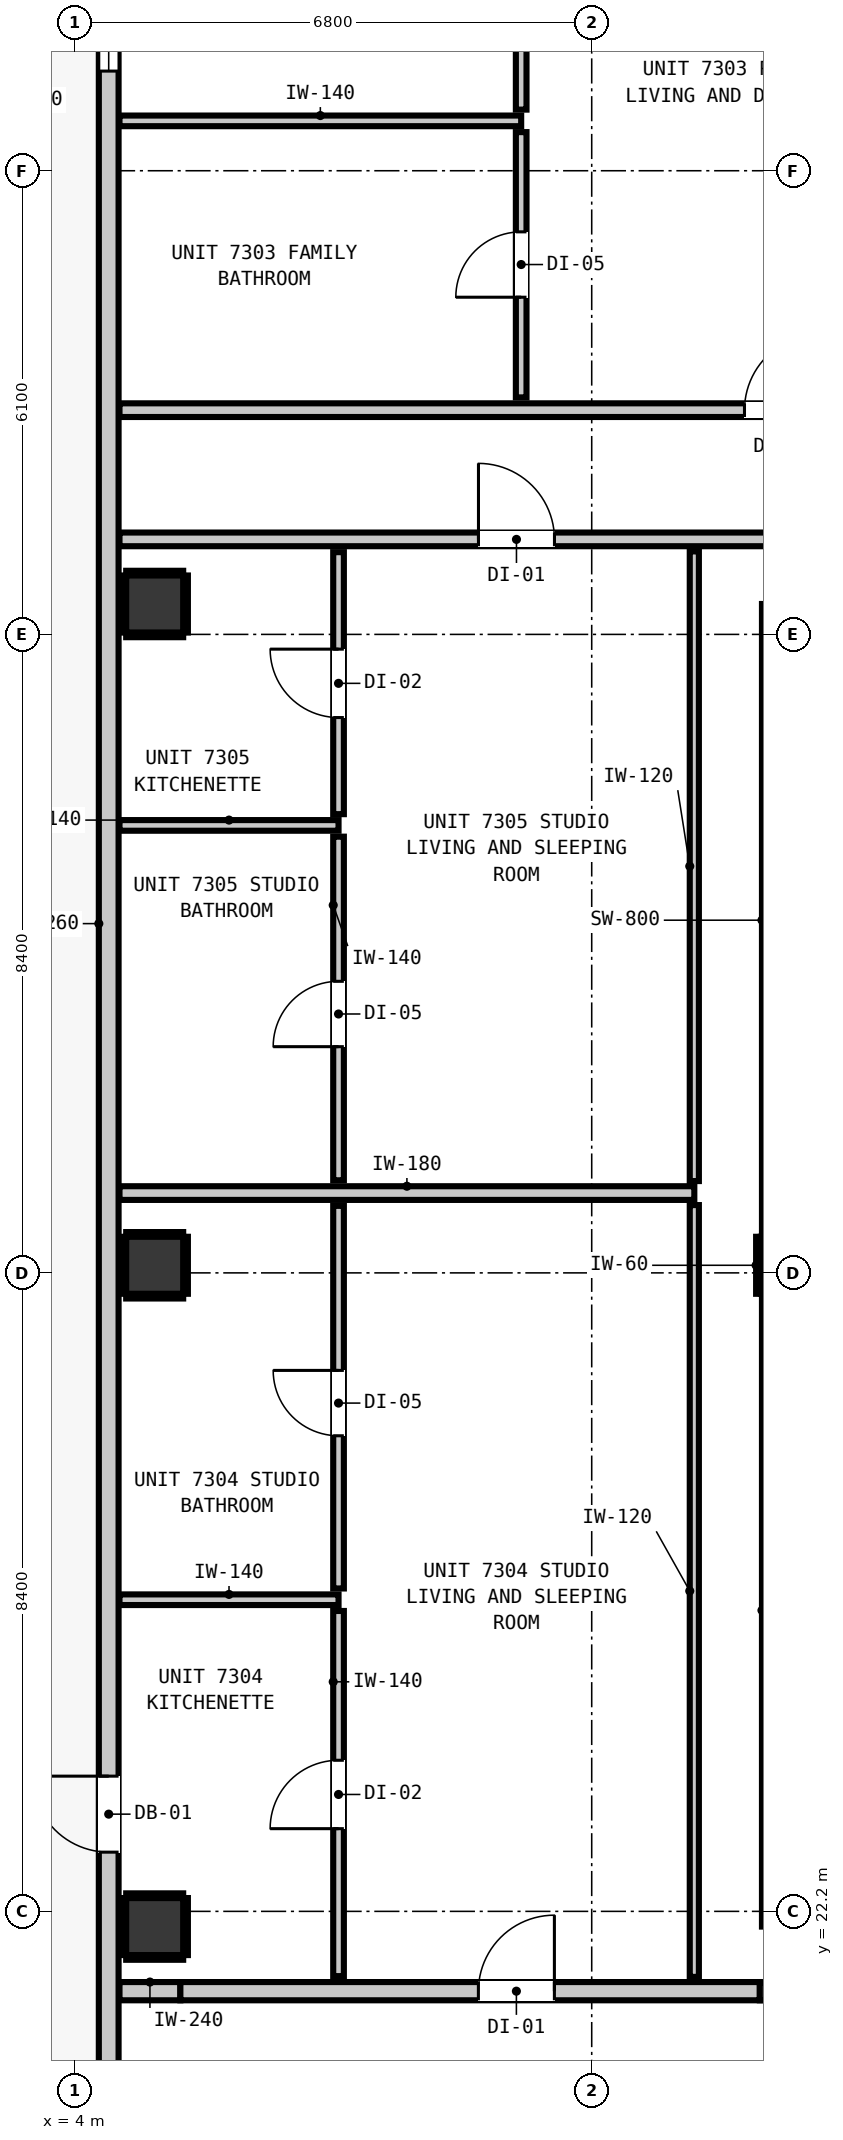
"""IFC4 building model, lengths in metres.
Left out: names, types, materials, properties, quantities, classifications, styles, units other than length and angle.
Written with IfcOpenShell. Run it as: python <this file> out.ifc"""

import sys

from ifc_helpers import new_model, si_unit, direction, frame, frame_2d, origin, origin_2d, place, context, subcontext, project, spatial, rectangle, extrude, element, fill, save


model = new_model("IFC4")
c1 = context("Model", 3, precision=1e-05, world=origin(), true_north=direction((0.0, 1.0)))
c2 = subcontext(c1, "Body", "Model", "MODEL_VIEW")
j1 = project(units=[si_unit("LENGTHUNIT", "METRE"), si_unit("PLANEANGLEUNIT", "RADIAN")], contexts=[c1])
p1 = place(None, origin())
s1 = spatial("IfcSite", under=j1, at=p1, CompositionType="ELEMENT")
p2 = place(p1, origin())
s2 = spatial("IfcBuilding", under=s1, at=p2, CompositionType="ELEMENT")
p3 = place(p2, frame((0.0, 0.0, 251.2)))
s3 = spatial("IfcBuildingStorey", under=s2, at=p3, CompositionType="ELEMENT", Elevation=251.2)
p4 = place(p3, frame((13.4, 30.7, 0.0), z_axis=(0.0, 0.0, 1.0), x_axis=(1.0, 0.0, 0.0)))
e1 = element("IfcColumn", 1, at=p4, inside=s3, PredefinedType="COLUMN", context=c2, shape_type="SweptSolid", body=[
    extrude(rectangle(XDim=0.75, YDim=0.75, at=origin_2d()), origin(), (0.0, 0.0, 1.0), 3.32),
])
p5 = place(p3, frame((13.44, 22.0, 0.0), z_axis=(0.0, 0.0, 1.0), x_axis=(0.0, 1.0, 0.0)))
e2 = element("IfcWall", 2, at=p5, inside=s3, PredefinedType="SHEAR", context=c2, shape_type="SweptSolid", body=[
    extrude(rectangle(XDim=8.32, YDim=0.8, at=frame_2d((4.16, 0.0))), origin(), (0.0, 0.0, 1.0), 3.32),
])
p6 = place(p3, frame((13.44, 31.08, 0.0), z_axis=(0.0, 0.0, 1.0), x_axis=(0.0, 1.0, 0.0)))
e3 = element("IfcWall", 3, at=p6, inside=s3, PredefinedType="SHEAR", context=c2, shape_type="SweptSolid", body=[
    extrude(rectangle(XDim=8.32, YDim=0.8, at=frame_2d((4.16, 0.0))), origin(), (0.0, 0.0, 1.0), 3.32),
])
for number, where, z_axis, x_axis in (
    (4, (5.05, 22.0, -0.2), (0.0, 0.0, 1.0), (1.0, 0.0, 0.0)),
    (5, (5.05, 30.7, -0.2), (0.0, 0.0, 1.0), (1.0, 0.0, 0.0)),
    (6, (5.05, 39.4, -0.2), (0.0, 0.0, 1.0), (1.0, 0.0, 0.0)),
):
    element("IfcColumn", number, at=place(p3, frame(where, z_axis=z_axis, x_axis=x_axis)), inside=s3, PredefinedType="COLUMN", context=c2, shape_type="SweptSolid", body=[
        extrude(rectangle(XDim=0.75, YDim=0.75, at=origin_2d()), origin(), (0.0, 0.0, 1.0), 3.52),
    ])
p7 = place(p3, frame((4.445, 18.545, 0.0), z_axis=(0.0, 0.0, 1.0), x_axis=(0.0, 1.0, 0.0)))
e7 = element("IfcWall", 7, at=p7, inside=s3, PredefinedType="STANDARD", context=c2, shape_type="SweptSolid", body=[
    extrude(rectangle(XDim=30.31, YDim=0.26, at=frame_2d((15.155, 0.0))), origin(), (0.0, 0.0, 1.0), 3.1),
])
p8 = place(p7, frame((4.434, 0.0, 0.0)))
e8 = element("IfcOpeningElement", 8, at=p8, cuts=e7, PredefinedType="OPENING", context=c2, shape_type="SweptSolid", body=[
    extrude(rectangle(XDim=1.0, YDim=2.15, at=frame_2d((0.5, 1.075))), frame((0.0, 0.14, 0.0), z_axis=(0.0, -1.0, 0.0), x_axis=(1.0, 0.0, 0.0)), (0.0, 0.0, 1.0), 0.28),
])
p9 = place(p7, frame((27.866, 0.0, 0.85)))
e9 = element("IfcOpeningElement", 9, at=p9, cuts=e7, PredefinedType="OPENING", context=c2, shape_type="SweptSolid", body=[
    extrude(rectangle(XDim=1.8, YDim=1.9, at=frame_2d((0.9, 0.95))), frame((0.0, 0.14, 0.0), z_axis=(0.0, -1.0, 0.0), x_axis=(1.0, 0.0, 0.0)), (0.0, 0.0, 1.0), 0.28),
])
p10 = place(p3, frame((4.587, 21.15, 0.0), z_axis=(0.0, 0.0, 1.0), x_axis=(1.0, 0.0, 0.0)))
e10 = element("IfcWall", 10, at=p10, inside=s3, PredefinedType="PARTITIONING", context=c2, shape_type="SweptSolid", body=[
    extrude(rectangle(XDim=0.801, YDim=0.24, at=frame_2d((0.4, 0.0))), origin(), (0.0, 0.0, 1.0), 3.1),
])
p11 = place(p3, frame((5.388, 21.15, 0.0), z_axis=(0.0, 0.0, 1.0), x_axis=(1.0, 0.0, 0.0)))
e11 = element("IfcWall", 11, at=p11, inside=s3, PredefinedType="PARTITIONING", context=c2, shape_type="SweptSolid", body=[
    extrude(rectangle(XDim=7.624, YDim=0.24, at=frame_2d((3.812, 0.0))), origin(), (0.0, 0.0, 1.0), 2.477),
])
p12 = place(p11, frame((3.921, 0.0, 0.0)))
e12 = element("IfcOpeningElement", 12, at=p12, cuts=e11, PredefinedType="OPENING", context=c2, shape_type="SweptSolid", body=[
    extrude(rectangle(XDim=1.0, YDim=2.15, at=frame_2d((0.5, 1.075))), frame((0.0, 0.13, 0.0), z_axis=(0.0, -1.0, 0.0), x_axis=(1.0, 0.0, 0.0)), (0.0, 0.0, 1.0), 0.26),
])
p13 = place(p3, frame((13.012, 21.15, 0.0), z_axis=(0.0, 0.0, 1.0), x_axis=(1.0, 0.0, 0.0)))
e13 = element("IfcWall", 13, at=p13, inside=s3, PredefinedType="PARTITIONING", context=c2, shape_type="SweptSolid", body=[
    extrude(rectangle(XDim=28.201, YDim=0.24, at=frame_2d((14.101, 0.0))), origin(), (0.0, 0.0, 1.0), 3.1),
])
p14 = place(p13, frame((5.198, 0.0, 0.0)))
e14 = element("IfcOpeningElement", 14, at=p14, cuts=e13, PredefinedType="OPENING", context=c2, shape_type="SweptSolid", body=[
    extrude(rectangle(XDim=1.1, YDim=2.15, at=frame_2d((0.55, 1.075))), frame((0.0, 0.13, 0.0), z_axis=(0.0, -1.0, 0.0), x_axis=(1.0, 0.0, 0.0)), (0.0, 0.0, 1.0), 0.26),
])
p15 = place(p3, frame((4.587, 31.65, 0.0), z_axis=(0.0, 0.0, 1.0), x_axis=(1.0, 0.0, 0.0)))
e15 = element("IfcWall", 15, at=p15, inside=s3, PredefinedType="PARTITIONING", context=c2, shape_type="SweptSolid", body=[
    extrude(rectangle(XDim=7.563, YDim=0.18, at=frame_2d((3.781, 0.0))), origin(), (0.0, 0.0, 1.0), 3.1),
])
p16 = place(p3, frame((4.587, 40.25, 0.0), z_axis=(0.0, 0.0, 1.0), x_axis=(1.0, 0.0, 0.0)))
e16 = element("IfcWall", 16, at=p16, inside=s3, PredefinedType="PARTITIONING", context=c2, shape_type="SweptSolid", body=[
    extrude(rectangle(XDim=36.626, YDim=0.18, at=frame_2d((18.313, 0.0))), origin(), (0.0, 0.0, 1.0), 3.1),
])
p17 = place(p16, frame((12.848, 0.0, 0.0)))
e17 = element("IfcOpeningElement", 17, at=p17, cuts=e16, PredefinedType="OPENING", context=c2, shape_type="SweptSolid", body=[
    extrude(rectangle(XDim=1.4, YDim=2.15, at=frame_2d((0.7, 1.075))), frame((0.0, 0.1, 0.0), z_axis=(0.0, -1.0, 0.0), x_axis=(1.0, 0.0, 0.0)), (0.0, 0.0, 1.0), 0.2),
])
p18 = place(p16, frame((4.723, 0.0, 0.0)))
e18 = element("IfcOpeningElement", 18, at=p18, cuts=e16, PredefinedType="OPENING", context=c2, shape_type="SweptSolid", body=[
    extrude(rectangle(XDim=1.0, YDim=2.15, at=frame_2d((0.5, 1.075))), frame((0.0, 0.1, 0.0), z_axis=(0.0, -1.0, 0.0), x_axis=(1.0, 0.0, 0.0)), (0.0, 0.0, 1.0), 0.2),
])
p19 = place(p3, frame((4.587, 41.95, 0.0), z_axis=(0.0, 0.0, 1.0), x_axis=(1.0, 0.0, 0.0)))
e19 = element("IfcWall", 19, at=p19, inside=s3, PredefinedType="PARTITIONING", context=c2, shape_type="SweptSolid", body=[
    extrude(rectangle(XDim=36.626, YDim=0.18, at=frame_2d((18.313, 0.0))), origin(), (0.0, 0.0, 1.0), 3.1),
])
p20 = place(p19, frame((8.223, 0.0, 0.0)))
e20 = element("IfcOpeningElement", 20, at=p20, cuts=e19, PredefinedType="OPENING", context=c2, shape_type="SweptSolid", body=[
    extrude(rectangle(XDim=1.0, YDim=2.15, at=frame_2d((0.5, 1.075))), frame((0.0, 0.1, 0.0), z_axis=(0.0, -1.0, 0.0), x_axis=(1.0, 0.0, 0.0)), (0.0, 0.0, 1.0), 0.2),
])
p21 = place(p19, frame((29.299, 0.0, 0.0)))
e21 = element("IfcOpeningElement", 21, at=p21, cuts=e19, PredefinedType="OPENING", context=c2, shape_type="SweptSolid", body=[
    extrude(rectangle(XDim=0.9, YDim=2.1, at=frame_2d((0.45, 1.05))), frame((0.0, 0.1, 0.0), z_axis=(0.0, -1.0, 0.0), x_axis=(1.0, 0.0, 0.0)), (0.0, 0.0, 1.0), 0.2),
])
for number, where, z_axis, x_axis in (
    (22, (4.587, 26.3, 0.0), (0.0, 0.0, 1.0), (1.0, 0.0, 0.0)),
    (23, (4.587, 36.487, 0.0), (0.0, 0.0, 1.0), (1.0, 0.0, 0.0)),
):
    element("IfcWall", number, at=place(p3, frame(where, z_axis=z_axis, x_axis=x_axis)), inside=s3, PredefinedType="PARTITIONING", context=c2, shape_type="SweptSolid", body=[
        extrude(rectangle(XDim=2.882, YDim=0.14, at=frame_2d((1.441, 0.0))), origin(), (0.0, 0.0, 1.0), 3.1),
    ])
p22 = place(p3, frame((4.587, 45.756, 0.0), z_axis=(0.0, 0.0, 1.0), x_axis=(1.0, 0.0, 0.0)))
e24 = element("IfcWall", 24, at=p22, inside=s3, PredefinedType="PARTITIONING", context=c2, shape_type="SweptSolid", body=[
    extrude(rectangle(XDim=5.285, YDim=0.14, at=frame_2d((2.643, 0.0))), origin(), (0.0, 0.0, 1.0), 3.1),
])
p23 = place(p3, frame((7.469, 21.348, 0.0), z_axis=(0.0, 0.0, 1.0), x_axis=(0.0, 1.0, 0.0)))
e25 = element("IfcWall", 25, at=p23, inside=s3, PredefinedType="PARTITIONING", context=c2, shape_type="SweptSolid", body=[
    extrude(rectangle(XDim=4.804, YDim=0.14, at=frame_2d((2.402, 0.0))), origin(), (0.0, 0.0, 1.0), 3.1),
])
p24 = place(p23, frame((1.94, 0.0, 0.0)))
e26 = element("IfcOpeningElement", 26, at=p24, cuts=e25, PredefinedType="OPENING", context=c2, shape_type="SweptSolid", body=[
    extrude(rectangle(XDim=0.9, YDim=2.1, at=frame_2d((0.45, 1.05))), frame((0.0, 0.08, 0.0), z_axis=(0.0, -1.0, 0.0), x_axis=(1.0, 0.0, 0.0)), (0.0, 0.0, 1.0), 0.16),
])
p25 = place(p3, frame((7.469, 26.448, 0.0), z_axis=(0.0, 0.0, 1.0), x_axis=(0.0, 1.0, 0.0)))
e27 = element("IfcWall", 27, at=p25, inside=s3, PredefinedType="PARTITIONING", context=c2, shape_type="SweptSolid", body=[
    extrude(rectangle(XDim=5.034, YDim=0.14, at=frame_2d((2.517, 0.0))), origin(), (0.0, 0.0, 1.0), 3.1),
])
p26 = place(p25, frame((2.009, 0.0, 0.0)))
e28 = element("IfcOpeningElement", 28, at=p26, cuts=e27, PredefinedType="OPENING", context=c2, shape_type="SweptSolid", body=[
    extrude(rectangle(XDim=0.86, YDim=2.02, at=frame_2d((0.43, 1.01))), frame((0.0, 0.08, 0.0), z_axis=(0.0, -1.0, 0.0), x_axis=(1.0, 0.0, 0.0)), (0.0, 0.0, 1.0), 0.16),
])
p27 = place(p3, frame((7.469, 31.818, 0.0), z_axis=(0.0, 0.0, 1.0), x_axis=(0.0, 1.0, 0.0)))
e29 = element("IfcWall", 29, at=p27, inside=s3, PredefinedType="PARTITIONING", context=c2, shape_type="SweptSolid", body=[
    extrude(rectangle(XDim=4.521, YDim=0.14, at=frame_2d((2.26, 0.0))), origin(), (0.0, 0.0, 1.0), 3.1),
])
p28 = place(p27, frame((1.758, 0.0, 0.0)))
e30 = element("IfcOpeningElement", 30, at=p28, cuts=e29, PredefinedType="OPENING", context=c2, shape_type="SweptSolid", body=[
    extrude(rectangle(XDim=0.86, YDim=2.02, at=frame_2d((0.43, 1.01))), frame((0.0, 0.08, 0.0), z_axis=(0.0, -1.0, 0.0), x_axis=(1.0, 0.0, 0.0)), (0.0, 0.0, 1.0), 0.16),
])
p29 = place(p3, frame((7.469, 36.635, 0.0), z_axis=(0.0, 0.0, 1.0), x_axis=(0.0, 1.0, 0.0)))
e31 = element("IfcWall", 31, at=p29, inside=s3, PredefinedType="PARTITIONING", context=c2, shape_type="SweptSolid", body=[
    extrude(rectangle(XDim=3.447, YDim=0.14, at=frame_2d((1.724, 0.0))), origin(), (0.0, 0.0, 1.0), 3.1),
])
p30 = place(p29, frame((1.271, 0.0, 0.0)))
e32 = element("IfcOpeningElement", 32, at=p30, cuts=e31, PredefinedType="OPENING", context=c2, shape_type="SweptSolid", body=[
    extrude(rectangle(XDim=0.9, YDim=2.1, at=frame_2d((0.45, 1.05))), frame((0.0, 0.08, 0.0), z_axis=(0.0, -1.0, 0.0), x_axis=(1.0, 0.0, 0.0)), (0.0, 0.0, 1.0), 0.16),
])
p31 = place(p3, frame((9.872, 42.118, 0.0), z_axis=(0.0, 0.0, 1.0), x_axis=(0.0, 1.0, 0.0)))
e33 = element("IfcWall", 33, at=p31, inside=s3, PredefinedType="PARTITIONING", context=c2, shape_type="SweptSolid", body=[
    extrude(rectangle(XDim=3.49, YDim=0.14, at=frame_2d((1.745, 0.0))), origin(), (0.0, 0.0, 1.0), 3.1),
])
p32 = place(p31, frame((1.318, 0.0, 0.0)))
e34 = element("IfcOpeningElement", 34, at=p32, cuts=e33, PredefinedType="OPENING", context=c2, shape_type="SweptSolid", body=[
    extrude(rectangle(XDim=0.86, YDim=2.02, at=frame_2d((0.43, 1.01))), frame((0.0, 0.08, 0.0), z_axis=(0.0, -1.0, 0.0), x_axis=(1.0, 0.0, 0.0)), (0.0, 0.0, 1.0), 0.16),
])
p33 = place(p3, frame((9.872, 45.904, 0.0), z_axis=(0.0, 0.0, 1.0), x_axis=(0.0, 1.0, 0.0)))
e35 = element("IfcWall", 35, at=p33, inside=s3, PredefinedType="PARTITIONING", context=c2, shape_type="SweptSolid", body=[
    extrude(rectangle(XDim=4.909, YDim=0.14, at=frame_2d((2.455, 0.0))), origin(), (0.0, 0.0, 1.0), 3.1),
])
p34 = place(p33, frame((1.911, 0.0, 0.0)))
e36 = element("IfcOpeningElement", 36, at=p34, cuts=e35, PredefinedType="OPENING", context=c2, shape_type="SweptSolid", body=[
    extrude(rectangle(XDim=0.9, YDim=2.1, at=frame_2d((0.45, 1.05))), frame((0.0, 0.08, 0.0), z_axis=(0.0, -1.0, 0.0), x_axis=(1.0, 0.0, 0.0)), (0.0, 0.0, 1.0), 0.16),
])
p35 = place(p3, frame((12.15, 21.338, 0.0), z_axis=(0.0, 0.0, 1.0), x_axis=(0.0, 1.0, 0.0)))
e37 = element("IfcWall", 37, at=p35, inside=s3, PredefinedType="PARTITIONING", context=c2, shape_type="SweptSolid", body=[
    extrude(rectangle(XDim=10.154, YDim=0.12, at=frame_2d((5.077, 0.0))), origin(), (0.0, 0.0, 1.0), 3.1),
])
p36 = place(p3, frame((12.15, 31.808, 0.0), z_axis=(0.0, 0.0, 1.0), x_axis=(0.0, 1.0, 0.0)))
e38 = element("IfcWall", 38, at=p36, inside=s3, PredefinedType="PARTITIONING", context=c2, shape_type="SweptSolid", body=[
    extrude(rectangle(XDim=8.284, YDim=0.12, at=frame_2d((4.142, 0.0))), origin(), (0.0, 0.0, 1.0), 3.1),
])
for number, where, z_axis, x_axis in (
    (39, (12.993, 30.325, 0.0), (0.0, 0.0, 1.0), (0.0, 1.0, 0.0)),
    (40, (4.675, 21.593, 0.0), (0.0, 0.0, 1.0), (1.0, 0.0, 0.0)),
    (41, (4.675, 22.407, 0.0), (0.0, 0.0, 1.0), (1.0, 0.0, 0.0)),
    (42, (4.643, 21.625, 0.0), (0.0, 0.0, 1.0), (0.0, 1.0, 0.0)),
    (43, (5.457, 21.625, 0.0), (0.0, 0.0, 1.0), (0.0, 1.0, 0.0)),
    (44, (4.675, 30.293, 0.0), (0.0, 0.0, 1.0), (1.0, 0.0, 0.0)),
    (45, (4.675, 31.107, 0.0), (0.0, 0.0, 1.0), (1.0, 0.0, 0.0)),
    (46, (4.643, 30.325, 0.0), (0.0, 0.0, 1.0), (0.0, 1.0, 0.0)),
    (47, (5.457, 30.325, 0.0), (0.0, 0.0, 1.0), (0.0, 1.0, 0.0)),
    (48, (4.675, 38.993, 0.0), (0.0, 0.0, 1.0), (1.0, 0.0, 0.0)),
    (49, (4.675, 39.807, 0.0), (0.0, 0.0, 1.0), (1.0, 0.0, 0.0)),
    (50, (4.643, 39.025, 0.0), (0.0, 0.0, 1.0), (0.0, 1.0, 0.0)),
    (51, (5.457, 39.025, 0.0), (0.0, 0.0, 1.0), (0.0, 1.0, 0.0)),
):
    element("IfcWall", number, at=place(p3, frame(where, z_axis=z_axis, x_axis=x_axis)), inside=s3, PredefinedType="PARTITIONING", context=c2, shape_type="SweptSolid", body=[
        extrude(rectangle(XDim=0.75, YDim=0.06, at=frame_2d((0.375, 0.0))), origin(), (0.0, 0.0, 1.0), 1.45),
    ])
p37 = place(p8, origin())
e52 = element("IfcDoor", 52, at=p37, inside=s3, OperationType="SINGLE_SWING_RIGHT", PredefinedType="DOOR", context=c2, shape_type="SweptSolid", body=[
    extrude(rectangle(XDim=1.0, YDim=2.15, at=frame_2d((0.5, 1.075))), frame((0.0, 0.025, 0.0), z_axis=(0.0, -1.0, 0.0), x_axis=(1.0, 0.0, 0.0)), (0.0, 0.0, 1.0), 0.05),
])
fill(e8, e52)
p38 = place(p9, origin())
e53 = element("IfcWindow", 53, at=p38, inside=s3, PartitioningType="SINGLE_PANEL", PredefinedType="WINDOW", context=c2, shape_type="SweptSolid", body=[
    extrude(rectangle(XDim=1.8, YDim=1.9, at=frame_2d((0.9, 0.95))), frame((0.0, 0.03, 0.0), z_axis=(0.0, -1.0, 0.0), x_axis=(1.0, 0.0, 0.0)), (0.0, 0.0, 1.0), 0.06),
])
fill(e9, e53)
p39 = place(p20, origin())
e54 = element("IfcDoor", 54, at=p39, inside=s3, OperationType="SINGLE_SWING_RIGHT", PredefinedType="DOOR", context=c2, shape_type="SweptSolid", body=[
    extrude(rectangle(XDim=1.0, YDim=2.15, at=frame_2d((0.5, 1.075))), frame((0.0, 0.025, 0.0), z_axis=(0.0, -1.0, 0.0), x_axis=(1.0, 0.0, 0.0)), (0.0, 0.0, 1.0), 0.05),
])
fill(e20, e54)
p40 = place(p32, origin())
e55 = element("IfcDoor", 55, at=p40, inside=s3, OperationType="SINGLE_SWING_LEFT", PredefinedType="DOOR", context=c2, shape_type="SweptSolid", body=[
    extrude(rectangle(XDim=0.86, YDim=2.02, at=frame_2d((0.43, 1.01))), frame((0.0, 0.025, 0.0), z_axis=(0.0, -1.0, 0.0), x_axis=(1.0, 0.0, 0.0)), (0.0, 0.0, 1.0), 0.05),
])
fill(e34, e55)
p41 = place(p12, origin())
e56 = element("IfcDoor", 56, at=p41, inside=s3, OperationType="SINGLE_SWING_RIGHT", PredefinedType="DOOR", context=c2, shape_type="SweptSolid", body=[
    extrude(rectangle(XDim=1.0, YDim=2.15, at=frame_2d((0.5, 1.075))), frame((0.0, 0.025, 0.0), z_axis=(0.0, -1.0, 0.0), x_axis=(1.0, 0.0, 0.0)), (0.0, 0.0, 1.0), 0.05),
])
fill(e12, e56)
p42 = place(p24, origin())
e57 = element("IfcDoor", 57, at=p42, inside=s3, OperationType="SINGLE_SWING_LEFT", PredefinedType="DOOR", context=c2, shape_type="SweptSolid", body=[
    extrude(rectangle(XDim=0.9, YDim=2.1, at=frame_2d((0.45, 1.05))), frame((0.0, 0.025, 0.0), z_axis=(0.0, -1.0, 0.0), x_axis=(1.0, 0.0, 0.0)), (0.0, 0.0, 1.0), 0.05),
])
fill(e26, e57)
p43 = place(p26, origin())
e58 = element("IfcDoor", 58, at=p43, inside=s3, OperationType="SINGLE_SWING_RIGHT", PredefinedType="DOOR", context=c2, shape_type="SweptSolid", body=[
    extrude(rectangle(XDim=0.86, YDim=2.02, at=frame_2d((0.43, 1.01))), frame((0.0, 0.025, 0.0), z_axis=(0.0, -1.0, 0.0), x_axis=(1.0, 0.0, 0.0)), (0.0, 0.0, 1.0), 0.05),
])
fill(e28, e58)
p44 = place(p18, origin())
e59 = element("IfcDoor", 59, at=p44, inside=s3, OperationType="SINGLE_SWING_LEFT", PredefinedType="DOOR", context=c2, shape_type="SweptSolid", body=[
    extrude(rectangle(XDim=1.0, YDim=2.15, at=frame_2d((0.5, 1.075))), frame((0.0, 0.025, 0.0), z_axis=(0.0, -1.0, 0.0), x_axis=(1.0, 0.0, 0.0)), (0.0, 0.0, 1.0), 0.05),
])
fill(e18, e59)
p45 = place(p30, origin())
e60 = element("IfcDoor", 60, at=p45, inside=s3, OperationType="SINGLE_SWING_RIGHT", PredefinedType="DOOR", context=c2, shape_type="SweptSolid", body=[
    extrude(rectangle(XDim=0.9, YDim=2.1, at=frame_2d((0.45, 1.05))), frame((0.0, 0.025, 0.0), z_axis=(0.0, -1.0, 0.0), x_axis=(1.0, 0.0, 0.0)), (0.0, 0.0, 1.0), 0.05),
])
fill(e32, e60)
p46 = place(p28, origin())
e61 = element("IfcDoor", 61, at=p46, inside=s3, OperationType="SINGLE_SWING_LEFT", PredefinedType="DOOR", context=c2, shape_type="SweptSolid", body=[
    extrude(rectangle(XDim=0.86, YDim=2.02, at=frame_2d((0.43, 1.01))), frame((0.0, 0.025, 0.0), z_axis=(0.0, -1.0, 0.0), x_axis=(1.0, 0.0, 0.0)), (0.0, 0.0, 1.0), 0.05),
])
fill(e30, e61)
save(model, sys.argv[1])
